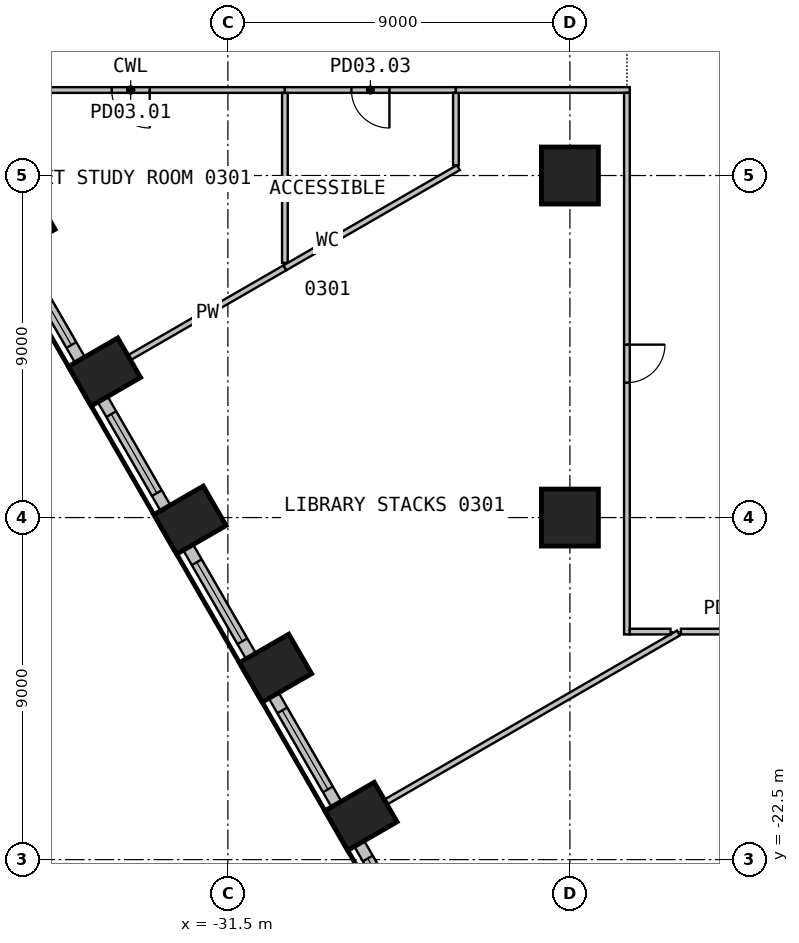
"""IFC4 building model, lengths in metres.
Left out: names, types, materials, properties, quantities, classifications, styles, units other than length and angle.
Written with IfcOpenShell. Run it as: python <this file> out.ifc"""

import sys

from ifc_helpers import new_model, si_unit, direction, frame, frame_2d, origin, origin_2d, place, context, subcontext, project, spatial, rectangle, circle, extrude, element, fill, save


model = new_model("IFC4")
c1 = context("Model", 3, precision=1e-05, world=origin(), true_north=direction((0.0, 1.0)))
c2 = subcontext(c1, "Body", "Model", "MODEL_VIEW")
j1 = project(units=[si_unit("LENGTHUNIT", "METRE"), si_unit("PLANEANGLEUNIT", "RADIAN")], contexts=[c1])
p1 = place(None, origin())
s1 = spatial("IfcSite", under=j1, at=p1, CompositionType="ELEMENT")
p2 = place(p1, origin())
s2 = spatial("IfcBuilding", under=s1, at=p2, CompositionType="ELEMENT")
p3 = place(p2, frame((0.0, 0.0, 15.6)))
s3 = spatial("IfcBuildingStorey", under=s2, at=p3, CompositionType="ELEMENT", Elevation=15.6)
for number, where, z_axis, x_axis in (
    (1, (-36.998, -5.772, 0.0), (0.0, 0.0, 1.0), (0.5, -0.866, 0.0)),
    (2, (-34.748, -9.669, 0.0), (0.0, 0.0, 1.0), (0.5, -0.866, 0.0)),
    (3, (-32.498, -13.566, 0.0), (0.0, 0.0, 1.0), (0.5, -0.866, 0.0)),
    (4, (-30.248, -17.463, 0.0), (0.0, 0.0, 1.0), (0.5, -0.866, 0.0)),
    (5, (-27.998, -21.361, 0.0), (0.0, 0.0, 1.0), (0.5, -0.866, 0.0)),
):
    element("IfcColumn", number, at=place(p3, frame(where, z_axis=z_axis, x_axis=x_axis)), inside=s3, PredefinedType="COLUMN", context=c2, shape_type="SweptSolid", body=[
        extrude(rectangle(XDim=1.2, YDim=1.5, at=origin_2d()), origin(), (0.0, 0.0, 1.0), 4.4),
    ])
for number, where, z_axis, x_axis in (
    (6, (-22.5, -13.5, 0.0), (0.0, 0.0, 1.0), (1.0, 0.0, 0.0)),
    (7, (-22.5, -4.5, 0.0), (0.0, 0.0, 1.0), (1.0, 0.0, 0.0)),
):
    element("IfcColumn", number, at=place(p3, frame(where, z_axis=z_axis, x_axis=x_axis)), inside=s3, PredefinedType="COLUMN", context=c2, shape_type="SweptSolid", body=[
        extrude(circle(Radius=0.75, at=origin_2d()), origin(), (0.0, 0.0, 1.0), 4.4),
    ])
p4 = place(p3, frame((-37.044, -6.492, 0.0), z_axis=(0.0, 0.0, 1.0), x_axis=(0.499991515992, -0.866030301974, 0.0)))
e8 = element("IfcWall", 8, at=p4, inside=s3, PredefinedType="SOLIDWALL", context=c2, shape_type="SweptSolid", body=[
    extrude(rectangle(XDim=3.299, YDim=0.3, at=frame_2d((1.649, 0.0))), origin(), (0.0, 0.0, 1.0), 4.4),
])
p5 = place(p4, frame((0.449, 0.0, 0.9)))
e9 = element("IfcOpeningElement", 9, at=p5, cuts=e8, PredefinedType="OPENING", context=c2, shape_type="SweptSolid", body=[
    extrude(rectangle(XDim=2.4, YDim=3.0, at=frame_2d((1.2, 1.5))), frame((0.0, 0.16, 0.0), z_axis=(0.0, -1.0, 0.0), x_axis=(1.0, 0.0, 0.0)), (0.0, 0.0, 1.0), 0.32),
])
p6 = place(p3, frame((-34.794, -10.389, 0.0), z_axis=(0.0, 0.0, 1.0), x_axis=(0.499991515992, -0.866030301974, 0.0)))
e10 = element("IfcWall", 10, at=p6, inside=s3, PredefinedType="SOLIDWALL", context=c2, shape_type="SweptSolid", body=[
    extrude(rectangle(XDim=3.299, YDim=0.3, at=frame_2d((1.649, 0.0))), origin(), (0.0, 0.0, 1.0), 4.4),
])
p7 = place(p6, frame((0.449, 0.0, 0.9)))
e11 = element("IfcOpeningElement", 11, at=p7, cuts=e10, PredefinedType="OPENING", context=c2, shape_type="SweptSolid", body=[
    extrude(rectangle(XDim=2.4, YDim=3.0, at=frame_2d((1.2, 1.5))), frame((0.0, 0.16, 0.0), z_axis=(0.0, -1.0, 0.0), x_axis=(1.0, 0.0, 0.0)), (0.0, 0.0, 1.0), 0.32),
])
p8 = place(p3, frame((-32.544, -14.286, 0.0), z_axis=(0.0, 0.0, 1.0), x_axis=(0.499991515992, -0.866030301974, 0.0)))
e12 = element("IfcWall", 12, at=p8, inside=s3, PredefinedType="SOLIDWALL", context=c2, shape_type="SweptSolid", body=[
    extrude(rectangle(XDim=3.299, YDim=0.3, at=frame_2d((1.649, 0.0))), origin(), (0.0, 0.0, 1.0), 4.4),
])
p9 = place(p8, frame((0.449, 0.0, 0.9)))
e13 = element("IfcOpeningElement", 13, at=p9, cuts=e12, PredefinedType="OPENING", context=c2, shape_type="SweptSolid", body=[
    extrude(rectangle(XDim=2.4, YDim=3.0, at=frame_2d((1.2, 1.5))), frame((0.0, 0.16, 0.0), z_axis=(0.0, -1.0, 0.0), x_axis=(1.0, 0.0, 0.0)), (0.0, 0.0, 1.0), 0.32),
])
p10 = place(p3, frame((-30.294, -18.184, 0.0), z_axis=(0.0, 0.0, 1.0), x_axis=(0.499991515992, -0.866030301974, 0.0)))
e14 = element("IfcWall", 14, at=p10, inside=s3, PredefinedType="SOLIDWALL", context=c2, shape_type="SweptSolid", body=[
    extrude(rectangle(XDim=3.299, YDim=0.3, at=frame_2d((1.649, 0.0))), origin(), (0.0, 0.0, 1.0), 4.4),
])
p11 = place(p10, frame((0.449, 0.0, 0.9)))
e15 = element("IfcOpeningElement", 15, at=p11, cuts=e14, PredefinedType="OPENING", context=c2, shape_type="SweptSolid", body=[
    extrude(rectangle(XDim=2.4, YDim=3.0, at=frame_2d((1.2, 1.5))), frame((0.0, 0.16, 0.0), z_axis=(0.0, -1.0, 0.0), x_axis=(1.0, 0.0, 0.0)), (0.0, 0.0, 1.0), 0.32),
])
p12 = place(p3, frame((-28.044, -22.081, 0.0), z_axis=(0.0, 0.0, 1.0), x_axis=(0.499991515992, -0.866030301974, 0.0)))
e16 = element("IfcWall", 16, at=p12, inside=s3, PredefinedType="SOLIDWALL", context=c2, shape_type="SweptSolid", body=[
    extrude(rectangle(XDim=3.299, YDim=0.3, at=frame_2d((1.649, 0.0))), origin(), (0.0, 0.0, 1.0), 4.4),
])
p13 = place(p12, frame((0.449, 0.0, 0.9)))
e17 = element("IfcOpeningElement", 17, at=p13, cuts=e16, PredefinedType="OPENING", context=c2, shape_type="SweptSolid", body=[
    extrude(rectangle(XDim=2.4, YDim=3.0, at=frame_2d((1.2, 1.5))), frame((0.0, 0.16, 0.0), z_axis=(0.0, -1.0, 0.0), x_axis=(1.0, 0.0, 0.0)), (0.0, 0.0, 1.0), 0.32),
])
p14 = place(p3, frame((-30.0, -2.25, 0.0), z_axis=(0.0, 0.0, 1.0), x_axis=(-1.0, 0.0, 0.0)))
e18 = element("IfcWall", 18, at=p14, inside=s3, PredefinedType="PARTITIONING", context=c2, shape_type="SweptSolid", body=[
    extrude(rectangle(XDim=8.115, YDim=0.15, at=frame_2d((4.058, 0.0))), origin(), (0.0, 0.0, 1.0), 4.4),
])
p15 = place(p14, frame((3.558, 0.0, 0.0)))
e19 = element("IfcOpeningElement", 19, at=p15, cuts=e18, PredefinedType="OPENING", context=c2, shape_type="SweptSolid", body=[
    extrude(rectangle(XDim=1.0, YDim=2.1, at=frame_2d((0.5, 1.05))), frame((0.0, 0.085, 0.0), z_axis=(0.0, -1.0, 0.0), x_axis=(1.0, 0.0, 0.0)), (0.0, 0.0, 1.0), 0.17),
])
p16 = place(p3, frame((-30.0, -6.928, 0.0), z_axis=(0.0, 0.0, 1.0), x_axis=(-0.86601216145, -0.500022935695, 0.0)))
e20 = element("IfcWall", 20, at=p16, inside=s3, PredefinedType="PARTITIONING", context=c2, shape_type="SweptSolid", body=[
    extrude(rectangle(XDim=4.712, YDim=0.15, at=frame_2d((2.356, 0.0))), origin(), (0.0, 0.0, 1.0), 4.4),
])
p17 = place(p3, frame((-30.0, -2.325, 0.0), z_axis=(0.0, 0.0, 1.0), x_axis=(0.0, -1.0, 0.0)))
e21 = element("IfcWall", 21, at=p17, inside=s3, PredefinedType="PARTITIONING", context=c2, shape_type="SweptSolid", body=[
    extrude(rectangle(XDim=4.473, YDim=0.15, at=frame_2d((2.237, 0.0))), origin(), (0.0, 0.0, 1.0), 4.4),
])
p18 = place(p3, frame((-25.435, -4.292, 0.0), z_axis=(0.0, 0.0, 1.0), x_axis=(-0.866031326857, -0.499989740797, 0.0)))
e22 = element("IfcWall", 22, at=p18, inside=s3, PredefinedType="PARTITIONING", context=c2, shape_type="SweptSolid", body=[
    extrude(rectangle(XDim=5.271, YDim=0.15, at=frame_2d((2.635, 0.0))), origin(), (0.0, 0.0, 1.0), 4.4),
])
p19 = place(p3, frame((-25.5, -2.25, 0.0), z_axis=(0.0, 0.0, 1.0), x_axis=(-1.0, 0.0, 0.0)))
e23 = element("IfcWall", 23, at=p19, inside=s3, PredefinedType="PARTITIONING", context=c2, shape_type="SweptSolid", body=[
    extrude(rectangle(XDim=4.5, YDim=0.15, at=frame_2d((2.25, 0.0))), origin(), (0.0, 0.0, 1.0), 4.4),
])
p20 = place(p19, frame((1.75, 0.0, 0.0)))
e24 = element("IfcOpeningElement", 24, at=p20, cuts=e23, PredefinedType="OPENING", context=c2, shape_type="SweptSolid", body=[
    extrude(rectangle(XDim=1.0, YDim=2.1, at=frame_2d((0.5, 1.05))), frame((0.0, 0.085, 0.0), z_axis=(0.0, -1.0, 0.0), x_axis=(1.0, 0.0, 0.0)), (0.0, 0.0, 1.0), 0.17),
])
p21 = place(p3, frame((-19.644, -16.538, 0.0), z_axis=(0.0, 0.0, 1.0), x_axis=(-0.866000072607, -0.50004387232, 0.0)))
e25 = element("IfcWall", 25, at=p21, inside=s3, PredefinedType="PARTITIONING", context=c2, shape_type="SweptSolid", body=[
    extrude(rectangle(XDim=8.876, YDim=0.15, at=frame_2d((4.438, 0.0))), origin(), (0.0, 0.0, 1.0), 4.4),
])
p22 = place(p3, frame((-25.5, -2.325, 0.0), z_axis=(0.0, 0.0, 1.0), x_axis=(0.0, -1.0, 0.0)))
e26 = element("IfcWall", 26, at=p22, inside=s3, PredefinedType="PARTITIONING", context=c2, shape_type="SweptSolid", body=[
    extrude(rectangle(XDim=1.905, YDim=0.15, at=frame_2d((0.953, 0.0))), origin(), (0.0, 0.0, 1.0), 4.4),
])
p23 = place(p3, frame((-20.925, -2.25, 0.0), z_axis=(0.0, 0.0, 1.0), x_axis=(-1.0, 0.0, 0.0)))
e27 = element("IfcWall", 27, at=p23, inside=s3, PredefinedType="PARTITIONING", context=c2, shape_type="SweptSolid", body=[
    extrude(rectangle(XDim=4.575, YDim=0.15, at=frame_2d((2.288, 0.0))), origin(), (0.0, 0.0, 1.0), 4.4),
])
p24 = place(p3, frame((-21.0, -2.325, 0.0), z_axis=(0.0, 0.0, 1.0), x_axis=(0.0, -1.0, 0.0)))
e28 = element("IfcWall", 28, at=p24, inside=s3, PredefinedType="PARTITIONING", context=c2, shape_type="SweptSolid", body=[
    extrude(rectangle(XDim=14.25, YDim=0.15, at=frame_2d((7.125, 0.0))), origin(), (0.0, 0.0, 1.0), 4.4),
])
p25 = place(p24, frame((6.625, 0.0, 0.0)))
e29 = element("IfcOpeningElement", 29, at=p25, cuts=e28, PredefinedType="OPENING", context=c2, shape_type="SweptSolid", body=[
    extrude(rectangle(XDim=1.0, YDim=2.1, at=frame_2d((0.5, 1.05))), frame((0.0, 0.085, 0.0), z_axis=(0.0, -1.0, 0.0), x_axis=(1.0, 0.0, 0.0)), (0.0, 0.0, 1.0), 0.17),
])
p26 = place(p3, frame((-20.925, -16.5, 0.0), z_axis=(0.0, 0.0, 1.0), x_axis=(1.0, 0.0, 0.0)))
e30 = element("IfcWall", 30, at=p26, inside=s3, PredefinedType="PARTITIONING", context=c2, shape_type="SweptSolid", body=[
    extrude(rectangle(XDim=1.071, YDim=0.15, at=frame_2d((0.536, 0.0))), origin(), (0.0, 0.0, 1.0), 4.4),
])
p27 = place(p3, frame((-16.175, -16.573, 0.0), z_axis=(0.0, 0.0, 1.0), x_axis=(-0.258838193525, -0.965920695281, 0.0)))
e31 = element("IfcWall", 31, at=p27, inside=s3, PredefinedType="PARTITIONING", context=c2, shape_type="SweptSolid", body=[
    extrude(rectangle(XDim=14.023, YDim=0.15, at=frame_2d((7.011, 0.0))), origin(), (0.0, 0.0, 1.0), 4.4),
])
p28 = place(p3, frame((-19.579, -16.5, 0.0), z_axis=(0.0, 0.0, 1.0), x_axis=(1.0, 0.0, 0.0)))
e32 = element("IfcWall", 32, at=p28, inside=s3, PredefinedType="PARTITIONING", context=c2, shape_type="SweptSolid", body=[
    extrude(rectangle(XDim=3.328, YDim=0.15, at=frame_2d((1.664, 0.0))), origin(), (0.0, 0.0, 1.0), 4.4),
])
p29 = place(p28, frame((1.164, 0.0, 0.0)))
e33 = element("IfcOpeningElement", 33, at=p29, cuts=e32, PredefinedType="OPENING", context=c2, shape_type="SweptSolid", body=[
    extrude(rectangle(XDim=1.0, YDim=2.1, at=frame_2d((0.5, 1.05))), frame((0.0, 0.085, 0.0), z_axis=(0.0, -1.0, 0.0), x_axis=(1.0, 0.0, 0.0)), (0.0, 0.0, 1.0), 0.17),
])
p30 = place(p5, origin())
e34 = element("IfcWindow", 34, at=p30, inside=s3, PartitioningType="SINGLE_PANEL", PredefinedType="WINDOW", context=c2, shape_type="SweptSolid", body=[
    extrude(rectangle(XDim=2.4, YDim=3.0, at=frame_2d((1.2, 1.5))), frame((0.0, 0.03, 0.0), z_axis=(0.0, -1.0, 0.0), x_axis=(1.0, 0.0, 0.0)), (0.0, 0.0, 1.0), 0.06),
])
fill(e9, e34)
p31 = place(p7, origin())
e35 = element("IfcWindow", 35, at=p31, inside=s3, PartitioningType="SINGLE_PANEL", PredefinedType="WINDOW", context=c2, shape_type="SweptSolid", body=[
    extrude(rectangle(XDim=2.4, YDim=3.0, at=frame_2d((1.2, 1.5))), frame((0.0, 0.03, 0.0), z_axis=(0.0, -1.0, 0.0), x_axis=(1.0, 0.0, 0.0)), (0.0, 0.0, 1.0), 0.06),
])
fill(e11, e35)
p32 = place(p9, origin())
e36 = element("IfcWindow", 36, at=p32, inside=s3, PartitioningType="SINGLE_PANEL", PredefinedType="WINDOW", context=c2, shape_type="SweptSolid", body=[
    extrude(rectangle(XDim=2.4, YDim=3.0, at=frame_2d((1.2, 1.5))), frame((0.0, 0.03, 0.0), z_axis=(0.0, -1.0, 0.0), x_axis=(1.0, 0.0, 0.0)), (0.0, 0.0, 1.0), 0.06),
])
fill(e13, e36)
p33 = place(p11, origin())
e37 = element("IfcWindow", 37, at=p33, inside=s3, PartitioningType="SINGLE_PANEL", PredefinedType="WINDOW", context=c2, shape_type="SweptSolid", body=[
    extrude(rectangle(XDim=2.4, YDim=3.0, at=frame_2d((1.2, 1.5))), frame((0.0, 0.03, 0.0), z_axis=(0.0, -1.0, 0.0), x_axis=(1.0, 0.0, 0.0)), (0.0, 0.0, 1.0), 0.06),
])
fill(e15, e37)
p34 = place(p13, origin())
e38 = element("IfcWindow", 38, at=p34, inside=s3, PartitioningType="SINGLE_PANEL", PredefinedType="WINDOW", context=c2, shape_type="SweptSolid", body=[
    extrude(rectangle(XDim=2.4, YDim=3.0, at=frame_2d((1.2, 1.5))), frame((0.0, 0.03, 0.0), z_axis=(0.0, -1.0, 0.0), x_axis=(1.0, 0.0, 0.0)), (0.0, 0.0, 1.0), 0.06),
])
fill(e17, e38)
p35 = place(p15, origin())
e39 = element("IfcDoor", 39, at=p35, inside=s3, OperationType="SINGLE_SWING_RIGHT", PredefinedType="DOOR", context=c2, shape_type="SweptSolid", body=[
    extrude(rectangle(XDim=1.0, YDim=2.1, at=frame_2d((0.5, 1.05))), frame((0.0, 0.025, 0.0), z_axis=(0.0, -1.0, 0.0), x_axis=(1.0, 0.0, 0.0)), (0.0, 0.0, 1.0), 0.05),
])
fill(e19, e39)
p36 = place(p20, origin())
e40 = element("IfcDoor", 40, at=p36, inside=s3, OperationType="SINGLE_SWING_RIGHT", PredefinedType="DOOR", context=c2, shape_type="SweptSolid", body=[
    extrude(rectangle(XDim=1.0, YDim=2.1, at=frame_2d((0.5, 1.05))), frame((0.0, 0.025, 0.0), z_axis=(0.0, -1.0, 0.0), x_axis=(1.0, 0.0, 0.0)), (0.0, 0.0, 1.0), 0.05),
])
fill(e24, e40)
p37 = place(p25, origin())
e41 = element("IfcDoor", 41, at=p37, inside=s3, OperationType="SINGLE_SWING_LEFT", PredefinedType="DOOR", context=c2, shape_type="SweptSolid", body=[
    extrude(rectangle(XDim=1.0, YDim=2.1, at=frame_2d((0.5, 1.05))), frame((0.0, 0.025, 0.0), z_axis=(0.0, -1.0, 0.0), x_axis=(1.0, 0.0, 0.0)), (0.0, 0.0, 1.0), 0.05),
])
fill(e29, e41)
save(model, sys.argv[1])
